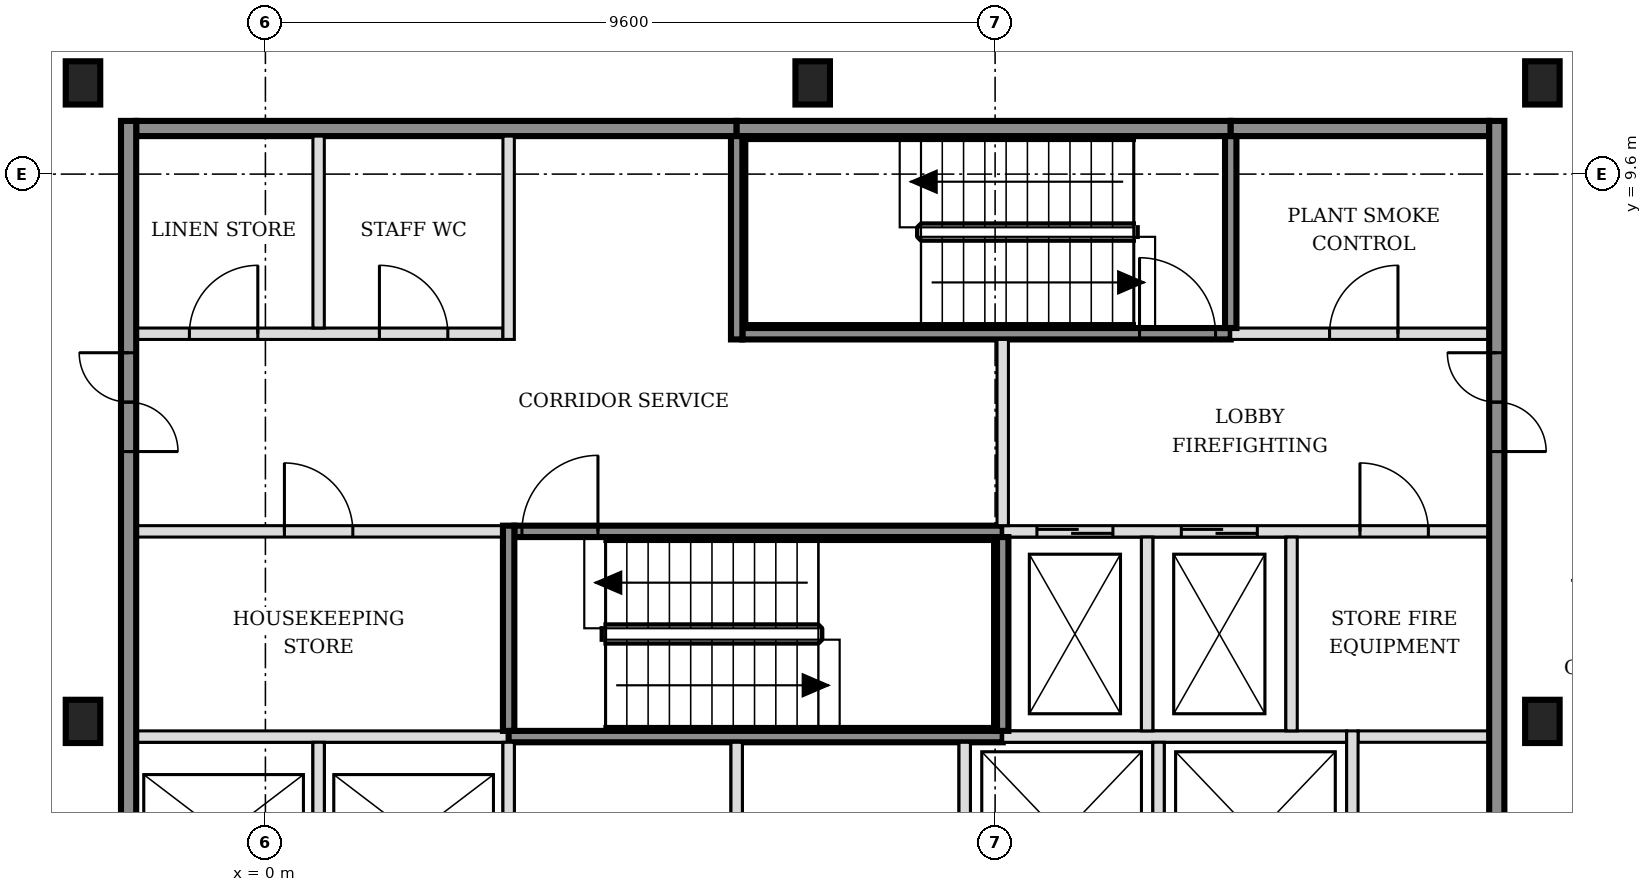
"""IFC4 building model, lengths in metres.
Left out: names, types, materials, properties, quantities, classifications, styles, units other than length and angle.
Written with IfcOpenShell. Run it as: python <this file> out.ifc"""

import sys

from ifc_helpers import new_model, si_unit, direction, frame, frame_2d, origin, origin_2d, place, context, subcontext, project, spatial, rectangle, i_section, extrude, element, fill, save


model = new_model("IFC4")
c1 = context("Model", 3, precision=1e-05, world=origin(), true_north=direction((0.0, 1.0)))
c2 = subcontext(c1, "Body", "Model", "MODEL_VIEW")
j1 = project(units=[si_unit("LENGTHUNIT", "METRE"), si_unit("PLANEANGLEUNIT", "RADIAN")], contexts=[c1])
p1 = place(None, origin())
s1 = spatial("IfcSite", under=j1, at=p1, CompositionType="ELEMENT")
p2 = place(p1, origin())
s2 = spatial("IfcBuilding", under=s1, at=p2, CompositionType="ELEMENT")
p3 = place(p2, frame((0.0, 0.0, 43.8)))
s3 = spatial("IfcBuildingStorey", under=s2, at=p3, CompositionType="ELEMENT", Elevation=43.8)
for number, where, z_axis, x_axis in (
    (1, (-2.4, 2.4, -0.15), (0.0, 0.0, 1.0), (1.0, 0.0, 0.0)),
    (2, (16.8, 2.4, -0.15), (0.0, 0.0, 1.0), (1.0, 0.0, 0.0)),
    (3, (-2.4, 10.8, -0.15), (0.0, 0.0, 1.0), (1.0, 0.0, 0.0)),
    (4, (7.2, 10.8, -0.15), (0.0, 0.0, 1.0), (1.0, 0.0, 0.0)),
    (5, (16.8, 10.8, -0.15), (0.0, 0.0, 1.0), (1.0, 0.0, 0.0)),
):
    element("IfcColumn", number, at=place(p3, frame(where, z_axis=z_axis, x_axis=x_axis)), inside=s3, PredefinedType="COLUMN", context=c2, shape_type="SweptSolid", body=[
        extrude(i_section(OverallWidth=0.454, OverallDepth=0.569, WebThickness=0.078, FlangeThickness=0.125, FilletRadius=0.015, at=origin_2d()), origin(), (0.0, 0.0, 1.0), 3.6),
    ])
p4 = place(p3, frame((-1.7, 2.2, 0.0), z_axis=(0.0, 0.0, 1.0), x_axis=(1.0, 0.0, 0.0)))
e6 = element("IfcWall", 6, at=p4, inside=s3, PredefinedType="SOLIDWALL", context=c2, shape_type="SweptSolid", body=[
    extrude(rectangle(XDim=4.9, YDim=0.15, at=frame_2d((2.45, 0.0))), origin(), (0.0, 0.0, 1.0), 3.45),
])
p5 = place(p3, frame((3.2, 2.2, 0.0), z_axis=(0.0, 0.0, 1.0), x_axis=(1.0, 0.0, 0.0)))
e7 = element("IfcWall", 7, at=p5, inside=s3, PredefinedType="SOLIDWALL", context=c2, shape_type="SweptSolid", body=[
    extrude(rectangle(XDim=6.5, YDim=0.15, at=frame_2d((3.25, 0.0))), origin(), (0.0, 0.0, 1.0), 3.45),
])
p6 = place(p3, frame((9.7, 2.2, 0.0), z_axis=(0.0, 0.0, 1.0), x_axis=(1.0, 0.0, 0.0)))
e8 = element("IfcWall", 8, at=p6, inside=s3, PredefinedType="SOLIDWALL", context=c2, shape_type="SweptSolid", body=[
    extrude(rectangle(XDim=4.525, YDim=0.15, at=frame_2d((2.263, 0.0))), origin(), (0.0, 0.0, 1.0), 3.45),
])
p7 = place(p3, frame((14.375, 2.2, 0.0), z_axis=(0.0, 0.0, 1.0), x_axis=(1.0, 0.0, 0.0)))
e9 = element("IfcWall", 9, at=p7, inside=s3, PredefinedType="PARTITIONING", context=c2, shape_type="SweptSolid", body=[
    extrude(rectangle(XDim=1.725, YDim=0.15, at=frame_2d((0.863, 0.0))), origin(), (0.0, 0.0, 1.0), 3.45),
])
p8 = place(p3, frame((-1.7, 4.9, 0.0), z_axis=(0.0, 0.0, 1.0), x_axis=(1.0, 0.0, 0.0)))
e10 = element("IfcWall", 10, at=p8, inside=s3, PredefinedType="PARTITIONING", context=c2, shape_type="SweptSolid", body=[
    extrude(rectangle(XDim=4.825, YDim=0.15, at=frame_2d((2.413, 0.0))), origin(), (0.0, 0.0, 1.0), 3.45),
])
p9 = place(p8, frame((1.95, 0.0, 0.0)))
e11 = element("IfcOpeningElement", 11, at=p9, cuts=e10, PredefinedType="OPENING", context=c2, shape_type="SweptSolid", body=[
    extrude(rectangle(XDim=0.9, YDim=2.1, at=frame_2d((0.45, 1.05))), frame((0.0, 0.085, 0.0), z_axis=(0.0, -1.0, 0.0), x_axis=(1.0, 0.0, 0.0)), (0.0, 0.0, 1.0), 0.17),
])
p10 = place(p3, frame((3.275, 4.9, 0.0), z_axis=(0.0, 0.0, 1.0), x_axis=(1.0, 0.0, 0.0)))
e12 = element("IfcWall", 12, at=p10, inside=s3, PredefinedType="SOLIDWALL", context=c2, shape_type="SweptSolid", body=[
    extrude(rectangle(XDim=6.425, YDim=0.15, at=frame_2d((3.212, 0.0))), origin(), (0.0, 0.0, 1.0), 3.45),
])
p11 = place(p10, frame((0.1, 0.0, 0.0)))
e13 = element("IfcOpeningElement", 13, at=p11, cuts=e12, PredefinedType="OPENING", context=c2, shape_type="SweptSolid", body=[
    extrude(rectangle(XDim=1.0, YDim=2.1, at=frame_2d((0.5, 1.05))), frame((0.0, 0.085, 0.0), z_axis=(0.0, -1.0, 0.0), x_axis=(1.0, 0.0, 0.0)), (0.0, 0.0, 1.0), 0.17),
])
p12 = place(p3, frame((9.7, 4.9, 0.0), z_axis=(0.0, 0.0, 1.0), x_axis=(1.0, 0.0, 0.0)))
e14 = element("IfcWall", 14, at=p12, inside=s3, PredefinedType="SOLIDWALL", context=c2, shape_type="SweptSolid", body=[
    extrude(rectangle(XDim=6.4, YDim=0.15, at=frame_2d((3.2, 0.0))), origin(), (0.0, 0.0, 1.0), 3.45),
])
p13 = place(p12, frame((0.45, 0.0, 0.0)))
e15 = element("IfcOpeningElement", 15, at=p13, cuts=e14, PredefinedType="OPENING", context=c2, shape_type="SweptSolid", body=[
    extrude(rectangle(XDim=1.0, YDim=2.1, at=frame_2d((0.5, 1.05))), frame((0.0, 0.085, 0.0), z_axis=(0.0, -1.0, 0.0), x_axis=(1.0, 0.0, 0.0)), (0.0, 0.0, 1.0), 0.17),
])
p14 = place(p12, frame((2.35, 0.0, 0.0)))
e16 = element("IfcOpeningElement", 16, at=p14, cuts=e14, PredefinedType="OPENING", context=c2, shape_type="SweptSolid", body=[
    extrude(rectangle(XDim=1.0, YDim=2.1, at=frame_2d((0.5, 1.05))), frame((0.0, 0.085, 0.0), z_axis=(0.0, -1.0, 0.0), x_axis=(1.0, 0.0, 0.0)), (0.0, 0.0, 1.0), 0.17),
])
p15 = place(p12, frame((4.7, 0.0, 0.0)))
e17 = element("IfcOpeningElement", 17, at=p15, cuts=e14, PredefinedType="OPENING", context=c2, shape_type="SweptSolid", body=[
    extrude(rectangle(XDim=0.9, YDim=2.1, at=frame_2d((0.45, 1.05))), frame((0.0, 0.085, 0.0), z_axis=(0.0, -1.0, 0.0), x_axis=(1.0, 0.0, 0.0)), (0.0, 0.0, 1.0), 0.17),
])
p16 = place(p3, frame((-1.7, 7.5, 0.0), z_axis=(0.0, 0.0, 1.0), x_axis=(1.0, 0.0, 0.0)))
e18 = element("IfcWall", 18, at=p16, inside=s3, PredefinedType="PARTITIONING", context=c2, shape_type="SweptSolid", body=[
    extrude(rectangle(XDim=4.825, YDim=0.15, at=frame_2d((2.413, 0.0))), origin(), (0.0, 0.0, 1.0), 3.45),
])
p17 = place(p16, frame((0.7, 0.0, 0.0)))
e19 = element("IfcOpeningElement", 19, at=p17, cuts=e18, PredefinedType="OPENING", context=c2, shape_type="SweptSolid", body=[
    extrude(rectangle(XDim=0.9, YDim=2.1, at=frame_2d((0.45, 1.05))), frame((0.0, 0.085, 0.0), z_axis=(0.0, -1.0, 0.0), x_axis=(1.0, 0.0, 0.0)), (0.0, 0.0, 1.0), 0.17),
])
p18 = place(p16, frame((3.2, 0.0, 0.0)))
e20 = element("IfcOpeningElement", 20, at=p18, cuts=e18, PredefinedType="OPENING", context=c2, shape_type="SweptSolid", body=[
    extrude(rectangle(XDim=0.9, YDim=2.1, at=frame_2d((0.45, 1.05))), frame((0.0, 0.085, 0.0), z_axis=(0.0, -1.0, 0.0), x_axis=(1.0, 0.0, 0.0)), (0.0, 0.0, 1.0), 0.17),
])
p19 = place(p3, frame((6.275, 7.5, 0.0), z_axis=(0.0, 0.0, 1.0), x_axis=(1.0, 0.0, 0.0)))
e21 = element("IfcWall", 21, at=p19, inside=s3, PredefinedType="SOLIDWALL", context=c2, shape_type="SweptSolid", body=[
    extrude(rectangle(XDim=6.425, YDim=0.15, at=frame_2d((3.212, 0.0))), origin(), (0.0, 0.0, 1.0), 3.45),
])
p20 = place(p19, frame((5.225, 0.0, 0.0)))
e22 = element("IfcOpeningElement", 22, at=p20, cuts=e21, PredefinedType="OPENING", context=c2, shape_type="SweptSolid", body=[
    extrude(rectangle(XDim=1.0, YDim=2.1, at=frame_2d((0.5, 1.05))), frame((0.0, 0.085, 0.0), z_axis=(0.0, -1.0, 0.0), x_axis=(1.0, 0.0, 0.0)), (0.0, 0.0, 1.0), 0.17),
])
p21 = place(p3, frame((12.7, 7.5, 0.0), z_axis=(0.0, 0.0, 1.0), x_axis=(1.0, 0.0, 0.0)))
e23 = element("IfcWall", 23, at=p21, inside=s3, PredefinedType="SOLIDWALL", context=c2, shape_type="SweptSolid", body=[
    extrude(rectangle(XDim=3.4, YDim=0.15, at=frame_2d((1.7, 0.0))), origin(), (0.0, 0.0, 1.0), 3.45),
])
p22 = place(p21, frame((1.3, 0.0, 0.0)))
e24 = element("IfcOpeningElement", 24, at=p22, cuts=e23, PredefinedType="OPENING", context=c2, shape_type="SweptSolid", body=[
    extrude(rectangle(XDim=0.9, YDim=2.1, at=frame_2d((0.45, 1.05))), frame((0.0, 0.085, 0.0), z_axis=(0.0, -1.0, 0.0), x_axis=(1.0, 0.0, 0.0)), (0.0, 0.0, 1.0), 0.17),
])
p23 = place(p3, frame((-1.7, 10.2, 0.0), z_axis=(0.0, 0.0, 1.0), x_axis=(1.0, 0.0, 0.0)))
e25 = element("IfcWall", 25, at=p23, inside=s3, PredefinedType="SOLIDWALL", context=c2, shape_type="SweptSolid", body=[
    extrude(rectangle(XDim=7.9, YDim=0.2, at=frame_2d((3.95, 0.0))), origin(), (0.0, 0.0, 1.0), 3.45),
])
p24 = place(p3, frame((6.2, 10.2, 0.0), z_axis=(0.0, 0.0, 1.0), x_axis=(1.0, 0.0, 0.0)))
e26 = element("IfcWall", 26, at=p24, inside=s3, PredefinedType="SOLIDWALL", context=c2, shape_type="SweptSolid", body=[
    extrude(rectangle(XDim=6.5, YDim=0.2, at=frame_2d((3.25, 0.0))), origin(), (0.0, 0.0, 1.0), 3.45),
])
p25 = place(p3, frame((12.7, 10.2, 0.0), z_axis=(0.0, 0.0, 1.0), x_axis=(1.0, 0.0, 0.0)))
e27 = element("IfcWall", 27, at=p25, inside=s3, PredefinedType="SOLIDWALL", context=c2, shape_type="SweptSolid", body=[
    extrude(rectangle(XDim=3.4, YDim=0.2, at=frame_2d((1.7, 0.0))), origin(), (0.0, 0.0, 1.0), 3.45),
])
p26 = place(p3, frame((-1.8, -5.5, 0.0), z_axis=(0.0, 0.0, 1.0), x_axis=(0.0, 1.0, 0.0)))
e28 = element("IfcWall", 28, at=p26, inside=s3, PredefinedType="SOLIDWALL", context=c2, shape_type="SweptSolid", body=[
    extrude(rectangle(XDim=15.8, YDim=0.2, at=frame_2d((7.9, 0.0))), origin(), (0.0, 0.0, 1.0), 3.45),
])
p27 = place(p26, frame((3.05, 0.0, 0.0)))
e29 = element("IfcOpeningElement", 29, at=p27, cuts=e28, PredefinedType="OPENING", context=c2, shape_type="SweptSolid", body=[
    extrude(rectangle(XDim=1.3, YDim=2.1, at=frame_2d((0.65, 1.05))), frame((0.0, 0.11, 0.0), z_axis=(0.0, -1.0, 0.0), x_axis=(1.0, 0.0, 0.0)), (0.0, 0.0, 1.0), 0.22),
])
p28 = place(p26, frame((11.45, 0.0, 0.0)))
e30 = element("IfcOpeningElement", 30, at=p28, cuts=e28, PredefinedType="OPENING", context=c2, shape_type="SweptSolid", body=[
    extrude(rectangle(XDim=1.3, YDim=2.1, at=frame_2d((0.65, 1.05))), frame((0.0, 0.11, 0.0), z_axis=(0.0, -1.0, 0.0), x_axis=(1.0, 0.0, 0.0)), (0.0, 0.0, 1.0), 0.22),
])
p29 = place(p3, frame((0.7, -0.325, 0.0), z_axis=(0.0, 0.0, 1.0), x_axis=(0.0, 1.0, 0.0)))
e31 = element("IfcWall", 31, at=p29, inside=s3, PredefinedType="SOLIDWALL", context=c2, shape_type="SweptSolid", body=[
    extrude(rectangle(XDim=2.45, YDim=0.15, at=frame_2d((1.225, 0.0))), origin(), (0.0, 0.0, 1.0), 3.45),
])
p30 = place(p3, frame((0.7, 7.575, 0.0), z_axis=(0.0, 0.0, 1.0), x_axis=(0.0, 1.0, 0.0)))
e32 = element("IfcWall", 32, at=p30, inside=s3, PredefinedType="PARTITIONING", context=c2, shape_type="SweptSolid", body=[
    extrude(rectangle(XDim=2.525, YDim=0.15, at=frame_2d((1.263, 0.0))), origin(), (0.0, 0.0, 1.0), 3.45),
])
p31 = place(p3, frame((3.2, -0.325, 0.0), z_axis=(0.0, 0.0, 1.0), x_axis=(0.0, 1.0, 0.0)))
e33 = element("IfcWall", 33, at=p31, inside=s3, PredefinedType="SOLIDWALL", context=c2, shape_type="SweptSolid", body=[
    extrude(rectangle(XDim=2.45, YDim=0.15, at=frame_2d((1.225, 0.0))), origin(), (0.0, 0.0, 1.0), 3.45),
])
p32 = place(p3, frame((3.2, 2.275, 0.0), z_axis=(0.0, 0.0, 1.0), x_axis=(0.0, 1.0, 0.0)))
e34 = element("IfcWall", 34, at=p32, inside=s3, PredefinedType="SOLIDWALL", context=c2, shape_type="SweptSolid", body=[
    extrude(rectangle(XDim=2.7, YDim=0.15, at=frame_2d((1.35, 0.0))), origin(), (0.0, 0.0, 1.0), 3.45),
])
p33 = place(p3, frame((3.2, 7.425, 0.0), z_axis=(0.0, 0.0, 1.0), x_axis=(0.0, 1.0, 0.0)))
e35 = element("IfcWall", 35, at=p33, inside=s3, PredefinedType="PARTITIONING", context=c2, shape_type="SweptSolid", body=[
    extrude(rectangle(XDim=2.675, YDim=0.15, at=frame_2d((1.337, 0.0))), origin(), (0.0, 0.0, 1.0), 3.45),
])
p34 = place(p3, frame((6.2, -0.325, 0.0), z_axis=(0.0, 0.0, 1.0), x_axis=(0.0, 1.0, 0.0)))
e36 = element("IfcWall", 36, at=p34, inside=s3, PredefinedType="SOLIDWALL", context=c2, shape_type="SweptSolid", body=[
    extrude(rectangle(XDim=2.45, YDim=0.15, at=frame_2d((1.225, 0.0))), origin(), (0.0, 0.0, 1.0), 3.45),
])
p35 = place(p3, frame((6.2, 7.425, 0.0), z_axis=(0.0, 0.0, 1.0), x_axis=(0.0, 1.0, 0.0)))
e37 = element("IfcWall", 37, at=p35, inside=s3, PredefinedType="SOLIDWALL", context=c2, shape_type="SweptSolid", body=[
    extrude(rectangle(XDim=2.675, YDim=0.15, at=frame_2d((1.337, 0.0))), origin(), (0.0, 0.0, 1.0), 3.45),
])
p36 = place(p3, frame((9.2, -0.325, 0.0), z_axis=(0.0, 0.0, 1.0), x_axis=(0.0, 1.0, 0.0)))
e38 = element("IfcWall", 38, at=p36, inside=s3, PredefinedType="SOLIDWALL", context=c2, shape_type="SweptSolid", body=[
    extrude(rectangle(XDim=2.45, YDim=0.15, at=frame_2d((1.225, 0.0))), origin(), (0.0, 0.0, 1.0), 3.45),
])
p37 = place(p3, frame((9.7, 2.275, 0.0), z_axis=(0.0, 0.0, 1.0), x_axis=(0.0, 1.0, 0.0)))
e39 = element("IfcWall", 39, at=p37, inside=s3, PredefinedType="SOLIDWALL", context=c2, shape_type="SweptSolid", body=[
    extrude(rectangle(XDim=2.55, YDim=0.15, at=frame_2d((1.275, 0.0))), origin(), (0.0, 0.0, 1.0), 3.45),
])
p38 = place(p3, frame((9.7, 4.975, 0.0), z_axis=(0.0, 0.0, 1.0), x_axis=(0.0, 1.0, 0.0)))
e40 = element("IfcWall", 40, at=p38, inside=s3, PredefinedType="SOLIDWALL", context=c2, shape_type="SweptSolid", body=[
    extrude(rectangle(XDim=2.45, YDim=0.15, at=frame_2d((1.225, 0.0))), origin(), (0.0, 0.0, 1.0), 3.45),
])
p39 = place(p3, frame((11.6, 2.275, 0.0), z_axis=(0.0, 0.0, 1.0), x_axis=(0.0, 1.0, 0.0)))
e41 = element("IfcWall", 41, at=p39, inside=s3, PredefinedType="SOLIDWALL", context=c2, shape_type="SweptSolid", body=[
    extrude(rectangle(XDim=2.55, YDim=0.15, at=frame_2d((1.275, 0.0))), origin(), (0.0, 0.0, 1.0), 3.45),
])
p40 = place(p3, frame((11.75, -0.325, 0.0), z_axis=(0.0, 0.0, 1.0), x_axis=(0.0, 1.0, 0.0)))
e42 = element("IfcWall", 42, at=p40, inside=s3, PredefinedType="SOLIDWALL", context=c2, shape_type="SweptSolid", body=[
    extrude(rectangle(XDim=2.45, YDim=0.15, at=frame_2d((1.225, 0.0))), origin(), (0.0, 0.0, 1.0), 3.45),
])
p41 = place(p3, frame((12.7, 7.575, 0.0), z_axis=(0.0, 0.0, 1.0), x_axis=(0.0, 1.0, 0.0)))
e43 = element("IfcWall", 43, at=p41, inside=s3, PredefinedType="SOLIDWALL", context=c2, shape_type="SweptSolid", body=[
    extrude(rectangle(XDim=2.525, YDim=0.15, at=frame_2d((1.263, 0.0))), origin(), (0.0, 0.0, 1.0), 3.45),
])
p42 = place(p3, frame((13.5, 2.275, 0.0), z_axis=(0.0, 0.0, 1.0), x_axis=(0.0, 1.0, 0.0)))
e44 = element("IfcWall", 44, at=p42, inside=s3, PredefinedType="SOLIDWALL", context=c2, shape_type="SweptSolid", body=[
    extrude(rectangle(XDim=2.55, YDim=0.15, at=frame_2d((1.275, 0.0))), origin(), (0.0, 0.0, 1.0), 3.45),
])
p43 = place(p3, frame((14.3, -0.475, 0.0), z_axis=(0.0, 0.0, 1.0), x_axis=(0.0, 1.0, 0.0)))
e45 = element("IfcWall", 45, at=p43, inside=s3, PredefinedType="SOLIDWALL", context=c2, shape_type="SweptSolid", body=[
    extrude(rectangle(XDim=2.75, YDim=0.15, at=frame_2d((1.375, 0.0))), origin(), (0.0, 0.0, 1.0), 3.45),
])
p44 = place(p3, frame((16.2, -5.5, 0.0), z_axis=(0.0, 0.0, 1.0), x_axis=(0.0, 1.0, 0.0)))
e46 = element("IfcWall", 46, at=p44, inside=s3, PredefinedType="SOLIDWALL", context=c2, shape_type="SweptSolid", body=[
    extrude(rectangle(XDim=15.8, YDim=0.2, at=frame_2d((7.9, 0.0))), origin(), (0.0, 0.0, 1.0), 3.45),
])
p45 = place(p44, frame((3.05, 0.0, 0.0)))
e47 = element("IfcOpeningElement", 47, at=p45, cuts=e46, PredefinedType="OPENING", context=c2, shape_type="SweptSolid", body=[
    extrude(rectangle(XDim=1.3, YDim=2.1, at=frame_2d((0.65, 1.05))), frame((0.0, 0.11, 0.0), z_axis=(0.0, -1.0, 0.0), x_axis=(1.0, 0.0, 0.0)), (0.0, 0.0, 1.0), 0.22),
])
p46 = place(p44, frame((11.45, 0.0, 0.0)))
e48 = element("IfcOpeningElement", 48, at=p46, cuts=e46, PredefinedType="OPENING", context=c2, shape_type="SweptSolid", body=[
    extrude(rectangle(XDim=1.3, YDim=2.1, at=frame_2d((0.65, 1.05))), frame((0.0, 0.11, 0.0), z_axis=(0.0, -1.0, 0.0), x_axis=(1.0, 0.0, 0.0)), (0.0, 0.0, 1.0), 0.22),
])
p47 = place(p13, origin())
e49 = element("IfcDoor", 49, at=p47, inside=s3, OperationType="DOUBLE_DOOR_SLIDING", PredefinedType="DOOR", context=c2, shape_type="SweptSolid", body=[
    extrude(rectangle(XDim=1.0, YDim=2.1, at=frame_2d((0.5, 1.05))), frame((0.0, 0.025, 0.0), z_axis=(0.0, -1.0, 0.0), x_axis=(1.0, 0.0, 0.0)), (0.0, 0.0, 1.0), 0.05),
])
fill(e15, e49)
p48 = place(p14, origin())
e50 = element("IfcDoor", 50, at=p48, inside=s3, OperationType="DOUBLE_DOOR_SLIDING", PredefinedType="DOOR", context=c2, shape_type="SweptSolid", body=[
    extrude(rectangle(XDim=1.0, YDim=2.1, at=frame_2d((0.5, 1.05))), frame((0.0, 0.025, 0.0), z_axis=(0.0, -1.0, 0.0), x_axis=(1.0, 0.0, 0.0)), (0.0, 0.0, 1.0), 0.05),
])
fill(e16, e50)
p49 = place(p11, origin())
e51 = element("IfcDoor", 51, at=p49, inside=s3, OperationType="SINGLE_SWING_RIGHT", PredefinedType="DOOR", context=c2, shape_type="SweptSolid", body=[
    extrude(rectangle(XDim=1.0, YDim=2.1, at=frame_2d((0.5, 1.05))), frame((0.0, 0.025, 0.0), z_axis=(0.0, -1.0, 0.0), x_axis=(1.0, 0.0, 0.0)), (0.0, 0.0, 1.0), 0.05),
])
fill(e13, e51)
p50 = place(p20, origin())
e52 = element("IfcDoor", 52, at=p50, inside=s3, OperationType="SINGLE_SWING_LEFT", PredefinedType="DOOR", context=c2, shape_type="SweptSolid", body=[
    extrude(rectangle(XDim=1.0, YDim=2.1, at=frame_2d((0.5, 1.05))), frame((0.0, 0.025, 0.0), z_axis=(0.0, -1.0, 0.0), x_axis=(1.0, 0.0, 0.0)), (0.0, 0.0, 1.0), 0.05),
])
fill(e22, e52)
p51 = place(p28, origin())
e53 = element("IfcDoor", 53, at=p51, inside=s3, OperationType="DOUBLE_DOOR_SINGLE_SWING", PredefinedType="DOOR", context=c2, shape_type="SweptSolid", body=[
    extrude(rectangle(XDim=1.3, YDim=2.1, at=frame_2d((0.65, 1.05))), frame((0.0, 0.025, 0.0), z_axis=(0.0, -1.0, 0.0), x_axis=(1.0, 0.0, 0.0)), (0.0, 0.0, 1.0), 0.05),
])
fill(e30, e53)
p52 = place(p46, origin())
e54 = element("IfcDoor", 54, at=p52, inside=s3, OperationType="DOUBLE_DOOR_SINGLE_SWING", PredefinedType="DOOR", context=c2, shape_type="SweptSolid", body=[
    extrude(rectangle(XDim=1.3, YDim=2.1, at=frame_2d((0.65, 1.05))), frame((0.0, 0.025, 0.0), z_axis=(0.0, -1.0, 0.0), x_axis=(1.0, 0.0, 0.0)), (0.0, 0.0, 1.0), 0.05),
])
fill(e48, e54)
p53 = place(p15, origin())
e55 = element("IfcDoor", 55, at=p53, inside=s3, OperationType="SINGLE_SWING_LEFT", PredefinedType="DOOR", context=c2, shape_type="SweptSolid", body=[
    extrude(rectangle(XDim=0.9, YDim=2.1, at=frame_2d((0.45, 1.05))), frame((0.0, 0.025, 0.0), z_axis=(0.0, -1.0, 0.0), x_axis=(1.0, 0.0, 0.0)), (0.0, 0.0, 1.0), 0.05),
])
fill(e17, e55)
p54 = place(p22, origin())
e56 = element("IfcDoor", 56, at=p54, inside=s3, OperationType="SINGLE_SWING_RIGHT", PredefinedType="DOOR", context=c2, shape_type="SweptSolid", body=[
    extrude(rectangle(XDim=0.9, YDim=2.1, at=frame_2d((0.45, 1.05))), frame((0.0, 0.025, 0.0), z_axis=(0.0, -1.0, 0.0), x_axis=(1.0, 0.0, 0.0)), (0.0, 0.0, 1.0), 0.05),
])
fill(e24, e56)
p55 = place(p9, origin())
e57 = element("IfcDoor", 57, at=p55, inside=s3, OperationType="SINGLE_SWING_LEFT", PredefinedType="DOOR", context=c2, shape_type="SweptSolid", body=[
    extrude(rectangle(XDim=0.9, YDim=2.1, at=frame_2d((0.45, 1.05))), frame((0.0, 0.025, 0.0), z_axis=(0.0, -1.0, 0.0), x_axis=(1.0, 0.0, 0.0)), (0.0, 0.0, 1.0), 0.05),
])
fill(e11, e57)
p56 = place(p17, origin())
e58 = element("IfcDoor", 58, at=p56, inside=s3, OperationType="SINGLE_SWING_RIGHT", PredefinedType="DOOR", context=c2, shape_type="SweptSolid", body=[
    extrude(rectangle(XDim=0.9, YDim=2.1, at=frame_2d((0.45, 1.05))), frame((0.0, 0.025, 0.0), z_axis=(0.0, -1.0, 0.0), x_axis=(1.0, 0.0, 0.0)), (0.0, 0.0, 1.0), 0.05),
])
fill(e19, e58)
p57 = place(p18, origin())
e59 = element("IfcDoor", 59, at=p57, inside=s3, OperationType="SINGLE_SWING_LEFT", PredefinedType="DOOR", context=c2, shape_type="SweptSolid", body=[
    extrude(rectangle(XDim=0.9, YDim=2.1, at=frame_2d((0.45, 1.05))), frame((0.0, 0.025, 0.0), z_axis=(0.0, -1.0, 0.0), x_axis=(1.0, 0.0, 0.0)), (0.0, 0.0, 1.0), 0.05),
])
fill(e20, e59)
save(model, sys.argv[1])
